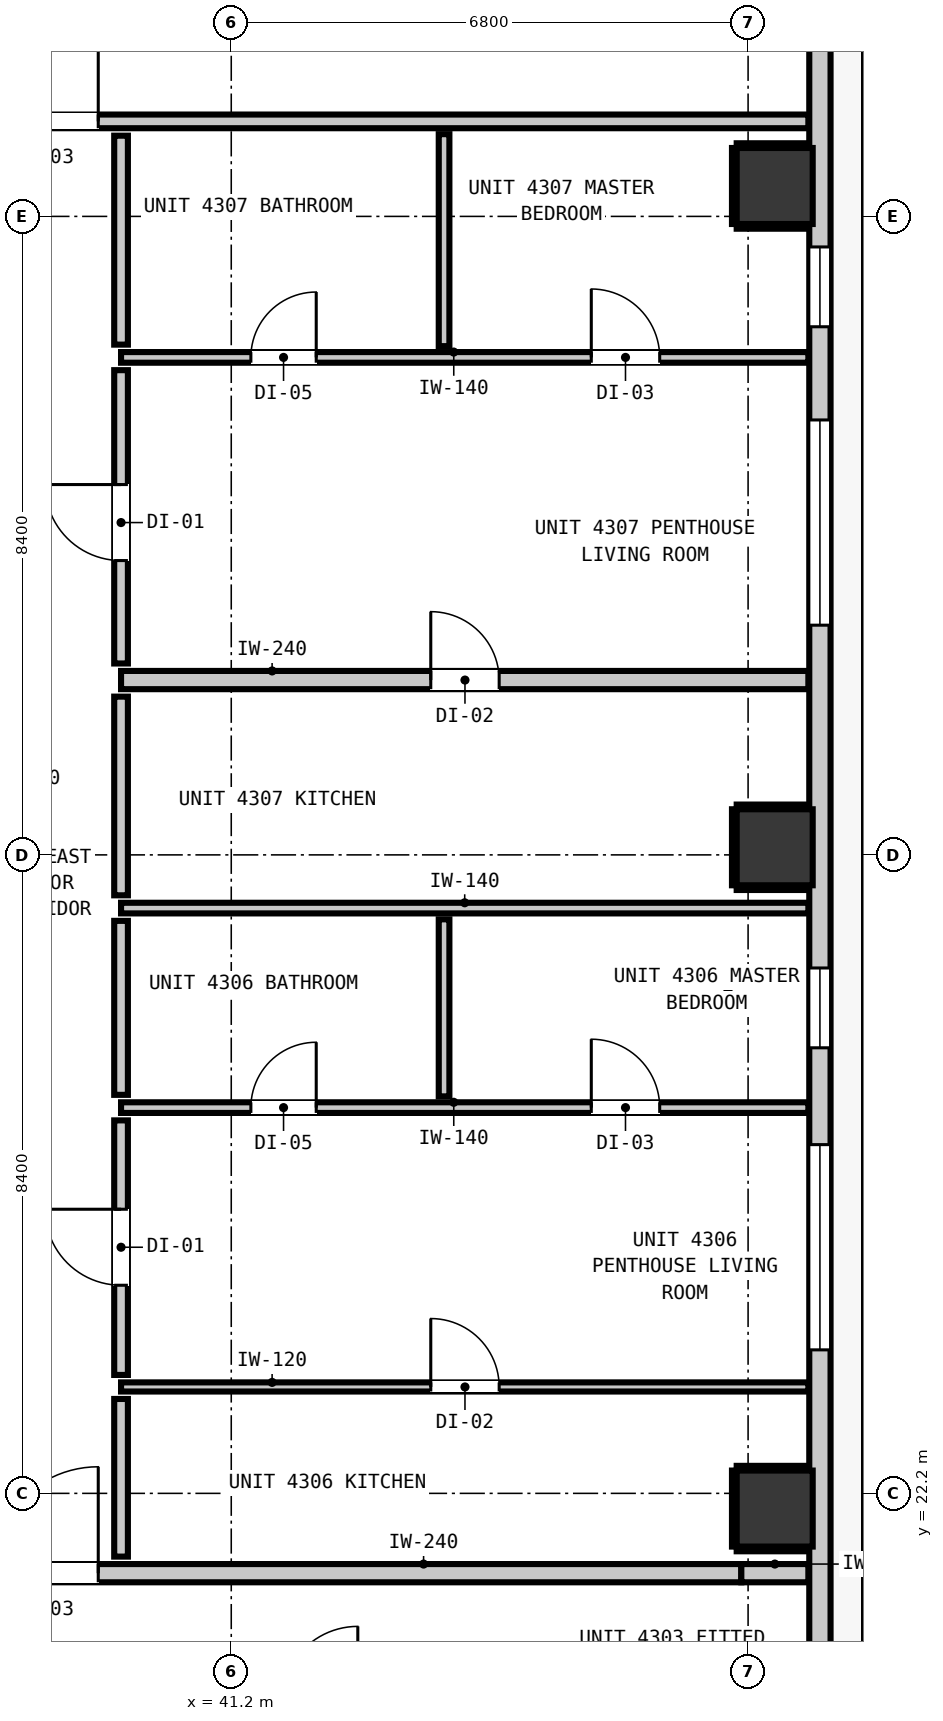
"""IFC4 building model, lengths in metres.
Left out: names, types, materials, properties, quantities, classifications, styles, units other than length and angle.
Written with IfcOpenShell. Run it as: python <this file> out.ifc"""

import sys

from ifc_helpers import new_model, si_unit, direction, frame, frame_2d, origin, origin_2d, place, context, subcontext, project, spatial, rectangle, extrude, element, fill, save


model = new_model("IFC4")
c1 = context("Model", 3, precision=1e-05, world=origin(), true_north=direction((0.0, 1.0)))
c2 = subcontext(c1, "Body", "Model", "MODEL_VIEW")
j1 = project(units=[si_unit("LENGTHUNIT", "METRE"), si_unit("PLANEANGLEUNIT", "RADIAN")], contexts=[c1])
p1 = place(None, origin())
s1 = spatial("IfcSite", under=j1, at=p1, CompositionType="ELEMENT")
p2 = place(p1, origin())
s2 = spatial("IfcBuilding", under=s1, at=p2, CompositionType="ELEMENT")
p3 = place(p2, frame((0.0, 0.0, 149.24)))
s3 = spatial("IfcBuildingStorey", under=s2, at=p3, CompositionType="ELEMENT", Elevation=149.24)
for number, where, z_axis, x_axis in (
    (1, (48.35, 22.0, 0.0), (0.0, 0.0, 1.0), (1.0, 0.0, 0.0)),
    (2, (48.35, 30.7, 0.0), (0.0, 0.0, 1.0), (1.0, 0.0, 0.0)),
    (3, (48.35, 39.4, 0.0), (0.0, 0.0, 1.0), (1.0, 0.0, 0.0)),
):
    element("IfcColumn", number, at=place(p3, frame(where, z_axis=z_axis, x_axis=x_axis)), inside=s3, PredefinedType="COLUMN", context=c2, shape_type="SweptSolid", body=[
        extrude(rectangle(XDim=1.0, YDim=1.0, at=origin_2d()), origin(), (0.0, 0.0, 1.0), 3.32),
    ])
p4 = place(p3, frame((48.945, 49.845, 0.0), z_axis=(0.0, 0.0, 1.0), x_axis=(0.0, -1.0, 0.0)))
e4 = element("IfcWall", 4, at=p4, inside=s3, PredefinedType="STANDARD", context=c2, shape_type="SweptSolid", body=[
    extrude(rectangle(XDim=32.29, YDim=0.28, at=frame_2d((16.145, 0.0))), origin(), (0.0, 0.0, 1.0), 3.08),
])
p5 = place(p4, frame((0.904, 0.0, 0.0)))
e5 = element("IfcOpeningElement", 5, at=p5, cuts=e4, PredefinedType="OPENING", context=c2, shape_type="SweptSolid", body=[
    extrude(rectangle(XDim=1.0, YDim=2.15, at=frame_2d((0.5, 1.075))), frame((0.0, 0.15, 0.0), z_axis=(0.0, -1.0, 0.0), x_axis=(1.0, 0.0, 0.0)), (0.0, 0.0, 1.0), 0.3),
])
p6 = place(p4, frame((3.074, 0.0, 0.85)))
e6 = element("IfcOpeningElement", 6, at=p6, cuts=e4, PredefinedType="OPENING", context=c2, shape_type="SweptSolid", body=[
    extrude(rectangle(XDim=1.05, YDim=1.65, at=frame_2d((0.525, 0.825))), frame((0.0, 0.15, 0.0), z_axis=(0.0, -1.0, 0.0), x_axis=(1.0, 0.0, 0.0)), (0.0, 0.0, 1.0), 0.3),
])
p7 = place(p4, frame((23.057, 0.0, 0.85)))
e7 = element("IfcOpeningElement", 7, at=p7, cuts=e4, PredefinedType="OPENING", context=c2, shape_type="SweptSolid", body=[
    extrude(rectangle(XDim=2.7, YDim=2.0, at=frame_2d((1.35, 1.0))), frame((0.0, 0.15, 0.0), z_axis=(0.0, -1.0, 0.0), x_axis=(1.0, 0.0, 0.0)), (0.0, 0.0, 1.0), 0.3),
])
p8 = place(p4, frame((20.733, 0.0, 0.85)))
e8 = element("IfcOpeningElement", 8, at=p8, cuts=e4, PredefinedType="OPENING", context=c2, shape_type="SweptSolid", body=[
    extrude(rectangle(XDim=1.05, YDim=1.65, at=frame_2d((0.525, 0.825))), frame((0.0, 0.15, 0.0), z_axis=(0.0, -1.0, 0.0), x_axis=(1.0, 0.0, 0.0)), (0.0, 0.0, 1.0), 0.3),
])
p9 = place(p4, frame((13.523, 0.0, 0.85)))
e9 = element("IfcOpeningElement", 9, at=p9, cuts=e4, PredefinedType="OPENING", context=c2, shape_type="SweptSolid", body=[
    extrude(rectangle(XDim=2.7, YDim=2.0, at=frame_2d((1.35, 1.0))), frame((0.0, 0.15, 0.0), z_axis=(0.0, -1.0, 0.0), x_axis=(1.0, 0.0, 0.0)), (0.0, 0.0, 1.0), 0.3),
])
p10 = place(p4, frame((11.247, 0.0, 0.85)))
e10 = element("IfcOpeningElement", 10, at=p10, cuts=e4, PredefinedType="OPENING", context=c2, shape_type="SweptSolid", body=[
    extrude(rectangle(XDim=1.05, YDim=1.65, at=frame_2d((0.525, 0.825))), frame((0.0, 0.15, 0.0), z_axis=(0.0, -1.0, 0.0), x_axis=(1.0, 0.0, 0.0)), (0.0, 0.0, 1.0), 0.3),
])
p11 = place(p3, frame((36.939, 21.15, 0.0), z_axis=(0.0, 0.0, 1.0), x_axis=(1.0, 0.0, 0.0)))
e11 = element("IfcWall", 11, at=p11, inside=s3, PredefinedType="PARTITIONING", context=c2, shape_type="SweptSolid", body=[
    extrude(rectangle(XDim=10.972, YDim=0.24, at=frame_2d((5.486, 0.0))), origin(), (0.0, 0.0, 1.0), 2.565),
])
p12 = place(p11, frame((1.111, 0.0, 0.0)))
e12 = element("IfcOpeningElement", 12, at=p12, cuts=e11, PredefinedType="OPENING", context=c2, shape_type="SweptSolid", body=[
    extrude(rectangle(XDim=1.4, YDim=2.15, at=frame_2d((0.7, 1.075))), frame((0.0, 0.13, 0.0), z_axis=(0.0, -1.0, 0.0), x_axis=(1.0, 0.0, 0.0)), (0.0, 0.0, 1.0), 0.26),
])
p13 = place(p3, frame((47.911, 21.15, 0.0), z_axis=(0.0, 0.0, 1.0), x_axis=(1.0, 0.0, 0.0)))
e13 = element("IfcWall", 13, at=p13, inside=s3, PredefinedType="PARTITIONING", context=c2, shape_type="SweptSolid", body=[
    extrude(rectangle(XDim=0.882, YDim=0.24, at=frame_2d((0.441, 0.0))), origin(), (0.0, 0.0, 1.0), 3.08),
])
p14 = place(p3, frame((39.75, 32.9, 0.0), z_axis=(0.0, 0.0, 1.0), x_axis=(1.0, 0.0, 0.0)))
e14 = element("IfcWall", 14, at=p14, inside=s3, PredefinedType="PARTITIONING", context=c2, shape_type="SweptSolid", body=[
    extrude(rectangle(XDim=9.043, YDim=0.24, at=frame_2d((4.521, 0.0))), origin(), (0.0, 0.0, 1.0), 3.08),
])
p15 = place(p14, frame((4.075, 0.0, 0.0)))
e15 = element("IfcOpeningElement", 15, at=p15, cuts=e14, PredefinedType="OPENING", context=c2, shape_type="SweptSolid", body=[
    extrude(rectangle(XDim=0.9, YDim=2.1, at=frame_2d((0.45, 1.05))), frame((0.0, 0.13, 0.0), z_axis=(0.0, -1.0, 0.0), x_axis=(1.0, 0.0, 0.0)), (0.0, 0.0, 1.0), 0.26),
])
p16 = place(p3, frame((9.407, 40.25, 0.0), z_axis=(0.0, 0.0, 1.0), x_axis=(1.0, 0.0, 0.0)))
e16 = element("IfcWall", 16, at=p16, inside=s3, PredefinedType="PARTITIONING", context=c2, shape_type="SweptSolid", body=[
    extrude(rectangle(XDim=39.386, YDim=0.18, at=frame_2d((19.693, 0.0))), origin(), (0.0, 0.0, 1.0), 3.08),
])
p17 = place(p16, frame((8.028, 0.0, 0.0)))
e17 = element("IfcOpeningElement", 17, at=p17, cuts=e16, PredefinedType="OPENING", context=c2, shape_type="SweptSolid", body=[
    extrude(rectangle(XDim=1.4, YDim=2.15, at=frame_2d((0.7, 1.075))), frame((0.0, 0.1, 0.0), z_axis=(0.0, -1.0, 0.0), x_axis=(1.0, 0.0, 0.0)), (0.0, 0.0, 1.0), 0.2),
])
p18 = place(p16, frame((1.192, 0.0, 0.0)))
e18 = element("IfcOpeningElement", 18, at=p18, cuts=e16, PredefinedType="OPENING", context=c2, shape_type="SweptSolid", body=[
    extrude(rectangle(XDim=1.4, YDim=2.15, at=frame_2d((0.7, 1.075))), frame((0.0, 0.1, 0.0), z_axis=(0.0, -1.0, 0.0), x_axis=(1.0, 0.0, 0.0)), (0.0, 0.0, 1.0), 0.2),
])
p19 = place(p16, frame((28.643, 0.0, 0.0)))
e19 = element("IfcOpeningElement", 19, at=p19, cuts=e16, PredefinedType="OPENING", context=c2, shape_type="SweptSolid", body=[
    extrude(rectangle(XDim=1.4, YDim=2.15, at=frame_2d((0.7, 1.075))), frame((0.0, 0.1, 0.0), z_axis=(0.0, -1.0, 0.0), x_axis=(1.0, 0.0, 0.0)), (0.0, 0.0, 1.0), 0.2),
])
p20 = place(p3, frame((39.75, 27.275, 0.0), z_axis=(0.0, 0.0, 1.0), x_axis=(1.0, 0.0, 0.0)))
e20 = element("IfcWall", 20, at=p20, inside=s3, PredefinedType="PARTITIONING", context=c2, shape_type="SweptSolid", body=[
    extrude(rectangle(XDim=9.043, YDim=0.14, at=frame_2d((4.521, 0.0))), origin(), (0.0, 0.0, 1.0), 3.08),
])
p21 = place(p20, frame((1.708, 0.0, 0.0)))
e21 = element("IfcOpeningElement", 21, at=p21, cuts=e20, PredefinedType="OPENING", context=c2, shape_type="SweptSolid", body=[
    extrude(rectangle(XDim=0.86, YDim=2.02, at=frame_2d((0.43, 1.01))), frame((0.0, 0.08, 0.0), z_axis=(0.0, -1.0, 0.0), x_axis=(1.0, 0.0, 0.0)), (0.0, 0.0, 1.0), 0.16),
])
p22 = place(p20, frame((6.187, 0.0, 0.0)))
e22 = element("IfcOpeningElement", 22, at=p22, cuts=e20, PredefinedType="OPENING", context=c2, shape_type="SweptSolid", body=[
    extrude(rectangle(XDim=0.9, YDim=2.1, at=frame_2d((0.45, 1.05))), frame((0.0, 0.08, 0.0), z_axis=(0.0, -1.0, 0.0), x_axis=(1.0, 0.0, 0.0)), (0.0, 0.0, 1.0), 0.16),
])
p23 = place(p3, frame((39.75, 29.9, 0.0), z_axis=(0.0, 0.0, 1.0), x_axis=(1.0, 0.0, 0.0)))
e23 = element("IfcWall", 23, at=p23, inside=s3, PredefinedType="PARTITIONING", context=c2, shape_type="SweptSolid", body=[
    extrude(rectangle(XDim=9.043, YDim=0.14, at=frame_2d((4.521, 0.0))), origin(), (0.0, 0.0, 1.0), 3.08),
])
p24 = place(p3, frame((39.75, 37.145, 0.0), z_axis=(0.0, 0.0, 1.0), x_axis=(1.0, 0.0, 0.0)))
e24 = element("IfcWall", 24, at=p24, inside=s3, PredefinedType="PARTITIONING", context=c2, shape_type="SweptSolid", body=[
    extrude(rectangle(XDim=9.043, YDim=0.14, at=frame_2d((4.521, 0.0))), origin(), (0.0, 0.0, 1.0), 3.08),
])
p25 = place(p24, frame((1.708, 0.0, 0.0)))
e25 = element("IfcOpeningElement", 25, at=p25, cuts=e24, PredefinedType="OPENING", context=c2, shape_type="SweptSolid", body=[
    extrude(rectangle(XDim=0.86, YDim=2.02, at=frame_2d((0.43, 1.01))), frame((0.0, 0.08, 0.0), z_axis=(0.0, -1.0, 0.0), x_axis=(1.0, 0.0, 0.0)), (0.0, 0.0, 1.0), 0.16),
])
p26 = place(p24, frame((6.187, 0.0, 0.0)))
e26 = element("IfcOpeningElement", 26, at=p26, cuts=e24, PredefinedType="OPENING", context=c2, shape_type="SweptSolid", body=[
    extrude(rectangle(XDim=0.9, YDim=2.1, at=frame_2d((0.45, 1.05))), frame((0.0, 0.08, 0.0), z_axis=(0.0, -1.0, 0.0), x_axis=(1.0, 0.0, 0.0)), (0.0, 0.0, 1.0), 0.16),
])
p27 = place(p3, frame((39.75, 23.6, 0.0), z_axis=(0.0, 0.0, 1.0), x_axis=(1.0, 0.0, 0.0)))
e27 = element("IfcWall", 27, at=p27, inside=s3, PredefinedType="PARTITIONING", context=c2, shape_type="SweptSolid", body=[
    extrude(rectangle(XDim=9.043, YDim=0.12, at=frame_2d((4.521, 0.0))), origin(), (0.0, 0.0, 1.0), 3.08),
])
p28 = place(p27, frame((4.075, 0.0, 0.0)))
e28 = element("IfcOpeningElement", 28, at=p28, cuts=e27, PredefinedType="OPENING", context=c2, shape_type="SweptSolid", body=[
    extrude(rectangle(XDim=0.9, YDim=2.1, at=frame_2d((0.45, 1.05))), frame((0.0, 0.07, 0.0), z_axis=(0.0, -1.0, 0.0), x_axis=(1.0, 0.0, 0.0)), (0.0, 0.0, 1.0), 0.14),
])
p29 = place(p3, frame((39.75, 21.368, 0.0), z_axis=(0.0, 0.0, 1.0), x_axis=(0.0, 1.0, 0.0)))
e29 = element("IfcWall", 29, at=p29, inside=s3, PredefinedType="PARTITIONING", context=c2, shape_type="SweptSolid", body=[
    extrude(rectangle(XDim=2.074, YDim=0.18, at=frame_2d((1.037, 0.0))), origin(), (0.0, 0.0, 1.0), 3.08),
])
p30 = place(p3, frame((39.75, 23.758, 0.0), z_axis=(0.0, 0.0, 1.0), x_axis=(0.0, 1.0, 0.0)))
e30 = element("IfcWall", 30, at=p30, inside=s3, PredefinedType="PARTITIONING", context=c2, shape_type="SweptSolid", body=[
    extrude(rectangle(XDim=3.349, YDim=0.18, at=frame_2d((1.674, 0.0))), origin(), (0.0, 0.0, 1.0), 3.08),
])
p31 = place(p30, frame((1.18, 0.0, 0.0)))
e31 = element("IfcOpeningElement", 31, at=p31, cuts=e30, PredefinedType="OPENING", context=c2, shape_type="SweptSolid", body=[
    extrude(rectangle(XDim=1.0, YDim=2.15, at=frame_2d((0.5, 1.075))), frame((0.0, 0.1, 0.0), z_axis=(0.0, -1.0, 0.0), x_axis=(1.0, 0.0, 0.0)), (0.0, 0.0, 1.0), 0.2),
])
p32 = place(p3, frame((39.75, 27.443, 0.0), z_axis=(0.0, 0.0, 1.0), x_axis=(0.0, 1.0, 0.0)))
e32 = element("IfcWall", 32, at=p32, inside=s3, PredefinedType="PARTITIONING", context=c2, shape_type="SweptSolid", body=[
    extrude(rectangle(XDim=2.289, YDim=0.18, at=frame_2d((1.145, 0.0))), origin(), (0.0, 0.0, 1.0), 3.08),
])
p33 = place(p3, frame((39.75, 30.068, 0.0), z_axis=(0.0, 0.0, 1.0), x_axis=(0.0, 1.0, 0.0)))
e33 = element("IfcWall", 33, at=p33, inside=s3, PredefinedType="PARTITIONING", context=c2, shape_type="SweptSolid", body=[
    extrude(rectangle(XDim=2.614, YDim=0.18, at=frame_2d((1.307, 0.0))), origin(), (0.0, 0.0, 1.0), 3.08),
])
p34 = place(p3, frame((39.75, 33.118, 0.0), z_axis=(0.0, 0.0, 1.0), x_axis=(0.0, 1.0, 0.0)))
e34 = element("IfcWall", 34, at=p34, inside=s3, PredefinedType="PARTITIONING", context=c2, shape_type="SweptSolid", body=[
    extrude(rectangle(XDim=3.859, YDim=0.18, at=frame_2d((1.93, 0.0))), origin(), (0.0, 0.0, 1.0), 3.08),
])
p35 = place(p34, frame((1.354, 0.0, 0.0)))
e35 = element("IfcOpeningElement", 35, at=p35, cuts=e34, PredefinedType="OPENING", context=c2, shape_type="SweptSolid", body=[
    extrude(rectangle(XDim=1.0, YDim=2.15, at=frame_2d((0.5, 1.075))), frame((0.0, 0.1, 0.0), z_axis=(0.0, -1.0, 0.0), x_axis=(1.0, 0.0, 0.0)), (0.0, 0.0, 1.0), 0.2),
])
p36 = place(p3, frame((39.75, 37.313, 0.0), z_axis=(0.0, 0.0, 1.0), x_axis=(0.0, 1.0, 0.0)))
e36 = element("IfcWall", 36, at=p36, inside=s3, PredefinedType="PARTITIONING", context=c2, shape_type="SweptSolid", body=[
    extrude(rectangle(XDim=2.749, YDim=0.18, at=frame_2d((1.375, 0.0))), origin(), (0.0, 0.0, 1.0), 3.08),
])
p37 = place(p3, frame((44.0, 27.423, 0.0), z_axis=(0.0, 0.0, 1.0), x_axis=(0.0, 1.0, 0.0)))
e37 = element("IfcWall", 37, at=p37, inside=s3, PredefinedType="PARTITIONING", context=c2, shape_type="SweptSolid", body=[
    extrude(rectangle(XDim=2.329, YDim=0.14, at=frame_2d((1.165, 0.0))), origin(), (0.0, 0.0, 1.0), 3.08),
])
p38 = place(p3, frame((44.0, 37.293, 0.0), z_axis=(0.0, 0.0, 1.0), x_axis=(0.0, 1.0, 0.0)))
e38 = element("IfcWall", 38, at=p38, inside=s3, PredefinedType="PARTITIONING", context=c2, shape_type="SweptSolid", body=[
    extrude(rectangle(XDim=2.789, YDim=0.14, at=frame_2d((1.395, 0.0))), origin(), (0.0, 0.0, 1.0), 3.08),
])
for number, where, z_axis, x_axis in (
    (39, (47.85, 21.468, 0.0), (0.0, 0.0, 1.0), (1.0, 0.0, 0.0)),
    (40, (47.85, 22.532, 0.0), (0.0, 0.0, 1.0), (1.0, 0.0, 0.0)),
):
    element("IfcWall", number, at=place(p3, frame(where, z_axis=z_axis, x_axis=x_axis)), inside=s3, PredefinedType="PARTITIONING", context=c2, shape_type="SweptSolid", body=[
        extrude(rectangle(XDim=0.94, YDim=0.06, at=frame_2d((0.47, 0.0))), origin(), (0.0, 0.0, 1.0), 1.45),
    ])
p39 = place(p3, frame((47.818, 21.5, 0.0), z_axis=(0.0, 0.0, 1.0), x_axis=(0.0, 1.0, 0.0)))
e41 = element("IfcWall", 41, at=p39, inside=s3, PredefinedType="PARTITIONING", context=c2, shape_type="SweptSolid", body=[
    extrude(rectangle(XDim=1.0, YDim=0.06, at=frame_2d((0.5, 0.0))), origin(), (0.0, 0.0, 1.0), 1.45),
])
for number, where, z_axis, x_axis in (
    (42, (47.85, 30.168, 0.0), (0.0, 0.0, 1.0), (1.0, 0.0, 0.0)),
    (43, (47.85, 31.232, 0.0), (0.0, 0.0, 1.0), (1.0, 0.0, 0.0)),
):
    element("IfcWall", number, at=place(p3, frame(where, z_axis=z_axis, x_axis=x_axis)), inside=s3, PredefinedType="PARTITIONING", context=c2, shape_type="SweptSolid", body=[
        extrude(rectangle(XDim=0.94, YDim=0.06, at=frame_2d((0.47, 0.0))), origin(), (0.0, 0.0, 1.0), 1.45),
    ])
p40 = place(p3, frame((47.818, 30.2, 0.0), z_axis=(0.0, 0.0, 1.0), x_axis=(0.0, 1.0, 0.0)))
e44 = element("IfcWall", 44, at=p40, inside=s3, PredefinedType="PARTITIONING", context=c2, shape_type="SweptSolid", body=[
    extrude(rectangle(XDim=1.0, YDim=0.06, at=frame_2d((0.5, 0.0))), origin(), (0.0, 0.0, 1.0), 1.45),
])
for number, where, z_axis, x_axis in (
    (45, (47.85, 38.868, 0.0), (0.0, 0.0, 1.0), (1.0, 0.0, 0.0)),
    (46, (47.85, 39.932, 0.0), (0.0, 0.0, 1.0), (1.0, 0.0, 0.0)),
):
    element("IfcWall", number, at=place(p3, frame(where, z_axis=z_axis, x_axis=x_axis)), inside=s3, PredefinedType="PARTITIONING", context=c2, shape_type="SweptSolid", body=[
        extrude(rectangle(XDim=0.94, YDim=0.06, at=frame_2d((0.47, 0.0))), origin(), (0.0, 0.0, 1.0), 1.45),
    ])
p41 = place(p3, frame((47.818, 38.9, 0.0), z_axis=(0.0, 0.0, 1.0), x_axis=(0.0, 1.0, 0.0)))
e47 = element("IfcWall", 47, at=p41, inside=s3, PredefinedType="PARTITIONING", context=c2, shape_type="SweptSolid", body=[
    extrude(rectangle(XDim=1.0, YDim=0.06, at=frame_2d((0.5, 0.0))), origin(), (0.0, 0.0, 1.0), 1.45),
])
p42 = place(p7, origin())
e48 = element("IfcWindow", 48, at=p42, inside=s3, PartitioningType="SINGLE_PANEL", PredefinedType="WINDOW", context=c2, shape_type="SweptSolid", body=[
    extrude(rectangle(XDim=2.7, YDim=2.0, at=frame_2d((1.35, 1.0))), frame((0.0, 0.03, 0.0), z_axis=(0.0, -1.0, 0.0), x_axis=(1.0, 0.0, 0.0)), (0.0, 0.0, 1.0), 0.06),
])
fill(e7, e48)
p43 = place(p8, origin())
e49 = element("IfcWindow", 49, at=p43, inside=s3, PartitioningType="SINGLE_PANEL", PredefinedType="WINDOW", context=c2, shape_type="SweptSolid", body=[
    extrude(rectangle(XDim=1.05, YDim=1.65, at=frame_2d((0.525, 0.825))), frame((0.0, 0.03, 0.0), z_axis=(0.0, -1.0, 0.0), x_axis=(1.0, 0.0, 0.0)), (0.0, 0.0, 1.0), 0.06),
])
fill(e8, e49)
p44 = place(p9, origin())
e50 = element("IfcWindow", 50, at=p44, inside=s3, PartitioningType="SINGLE_PANEL", PredefinedType="WINDOW", context=c2, shape_type="SweptSolid", body=[
    extrude(rectangle(XDim=2.7, YDim=2.0, at=frame_2d((1.35, 1.0))), frame((0.0, 0.03, 0.0), z_axis=(0.0, -1.0, 0.0), x_axis=(1.0, 0.0, 0.0)), (0.0, 0.0, 1.0), 0.06),
])
fill(e9, e50)
p45 = place(p10, origin())
e51 = element("IfcWindow", 51, at=p45, inside=s3, PartitioningType="SINGLE_PANEL", PredefinedType="WINDOW", context=c2, shape_type="SweptSolid", body=[
    extrude(rectangle(XDim=1.05, YDim=1.65, at=frame_2d((0.525, 0.825))), frame((0.0, 0.03, 0.0), z_axis=(0.0, -1.0, 0.0), x_axis=(1.0, 0.0, 0.0)), (0.0, 0.0, 1.0), 0.06),
])
fill(e10, e51)
p46 = place(p12, origin())
e52 = element("IfcDoor", 52, at=p46, inside=s3, OperationType="SINGLE_SWING_RIGHT", PredefinedType="DOOR", context=c2, shape_type="SweptSolid", body=[
    extrude(rectangle(XDim=1.4, YDim=2.15, at=frame_2d((0.7, 1.075))), frame((0.0, 0.025, 0.0), z_axis=(0.0, -1.0, 0.0), x_axis=(1.0, 0.0, 0.0)), (0.0, 0.0, 1.0), 0.05),
])
fill(e12, e52)
p47 = place(p19, origin())
e53 = element("IfcDoor", 53, at=p47, inside=s3, OperationType="SINGLE_SWING_RIGHT", PredefinedType="DOOR", context=c2, shape_type="SweptSolid", body=[
    extrude(rectangle(XDim=1.4, YDim=2.15, at=frame_2d((0.7, 1.075))), frame((0.0, 0.025, 0.0), z_axis=(0.0, -1.0, 0.0), x_axis=(1.0, 0.0, 0.0)), (0.0, 0.0, 1.0), 0.05),
])
fill(e19, e53)
p48 = place(p31, origin())
e54 = element("IfcDoor", 54, at=p48, inside=s3, OperationType="SINGLE_SWING_RIGHT", PredefinedType="DOOR", context=c2, shape_type="SweptSolid", body=[
    extrude(rectangle(XDim=1.0, YDim=2.15, at=frame_2d((0.5, 1.075))), frame((0.0, 0.025, 0.0), z_axis=(0.0, -1.0, 0.0), x_axis=(1.0, 0.0, 0.0)), (0.0, 0.0, 1.0), 0.05),
])
fill(e31, e54)
p49 = place(p28, origin())
e55 = element("IfcDoor", 55, at=p49, inside=s3, OperationType="SINGLE_SWING_LEFT", PredefinedType="DOOR", context=c2, shape_type="SweptSolid", body=[
    extrude(rectangle(XDim=0.9, YDim=2.1, at=frame_2d((0.45, 1.05))), frame((0.0, 0.025, 0.0), z_axis=(0.0, -1.0, 0.0), x_axis=(1.0, 0.0, 0.0)), (0.0, 0.0, 1.0), 0.05),
])
fill(e28, e55)
p50 = place(p21, origin())
e56 = element("IfcDoor", 56, at=p50, inside=s3, OperationType="SINGLE_SWING_RIGHT", PredefinedType="DOOR", context=c2, shape_type="SweptSolid", body=[
    extrude(rectangle(XDim=0.86, YDim=2.02, at=frame_2d((0.43, 1.01))), frame((0.0, 0.025, 0.0), z_axis=(0.0, -1.0, 0.0), x_axis=(1.0, 0.0, 0.0)), (0.0, 0.0, 1.0), 0.05),
])
fill(e21, e56)
p51 = place(p22, origin())
e57 = element("IfcDoor", 57, at=p51, inside=s3, OperationType="SINGLE_SWING_LEFT", PredefinedType="DOOR", context=c2, shape_type="SweptSolid", body=[
    extrude(rectangle(XDim=0.9, YDim=2.1, at=frame_2d((0.45, 1.05))), frame((0.0, 0.025, 0.0), z_axis=(0.0, -1.0, 0.0), x_axis=(1.0, 0.0, 0.0)), (0.0, 0.0, 1.0), 0.05),
])
fill(e22, e57)
p52 = place(p35, origin())
e58 = element("IfcDoor", 58, at=p52, inside=s3, OperationType="SINGLE_SWING_RIGHT", PredefinedType="DOOR", context=c2, shape_type="SweptSolid", body=[
    extrude(rectangle(XDim=1.0, YDim=2.15, at=frame_2d((0.5, 1.075))), frame((0.0, 0.025, 0.0), z_axis=(0.0, -1.0, 0.0), x_axis=(1.0, 0.0, 0.0)), (0.0, 0.0, 1.0), 0.05),
])
fill(e35, e58)
p53 = place(p15, origin())
e59 = element("IfcDoor", 59, at=p53, inside=s3, OperationType="SINGLE_SWING_LEFT", PredefinedType="DOOR", context=c2, shape_type="SweptSolid", body=[
    extrude(rectangle(XDim=0.9, YDim=2.1, at=frame_2d((0.45, 1.05))), frame((0.0, 0.025, 0.0), z_axis=(0.0, -1.0, 0.0), x_axis=(1.0, 0.0, 0.0)), (0.0, 0.0, 1.0), 0.05),
])
fill(e15, e59)
p54 = place(p25, origin())
e60 = element("IfcDoor", 60, at=p54, inside=s3, OperationType="SINGLE_SWING_RIGHT", PredefinedType="DOOR", context=c2, shape_type="SweptSolid", body=[
    extrude(rectangle(XDim=0.86, YDim=2.02, at=frame_2d((0.43, 1.01))), frame((0.0, 0.025, 0.0), z_axis=(0.0, -1.0, 0.0), x_axis=(1.0, 0.0, 0.0)), (0.0, 0.0, 1.0), 0.05),
])
fill(e25, e60)
p55 = place(p26, origin())
e61 = element("IfcDoor", 61, at=p55, inside=s3, OperationType="SINGLE_SWING_LEFT", PredefinedType="DOOR", context=c2, shape_type="SweptSolid", body=[
    extrude(rectangle(XDim=0.9, YDim=2.1, at=frame_2d((0.45, 1.05))), frame((0.0, 0.025, 0.0), z_axis=(0.0, -1.0, 0.0), x_axis=(1.0, 0.0, 0.0)), (0.0, 0.0, 1.0), 0.05),
])
fill(e26, e61)
save(model, sys.argv[1])
